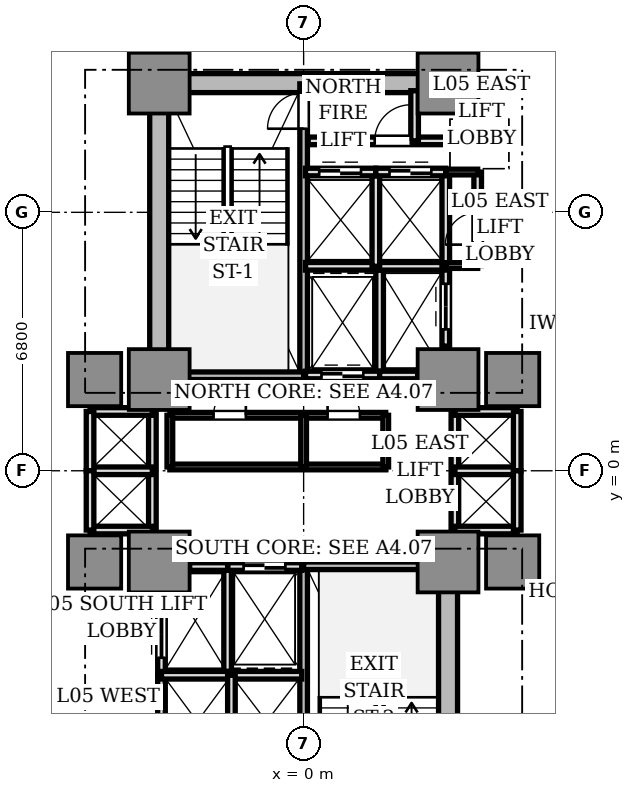
"""IFC4 building model, lengths in metres.
Left out: names, types, materials, properties, quantities, classifications, styles, units other than length and angle.
Written with IfcOpenShell. Run it as: python <this file> out.ifc"""

import sys

from ifc_helpers import new_model, si_unit, direction, frame, frame_2d, origin, origin_2d, place, context, subcontext, project, spatial, rectangle, extrude, source, transform, mapped, element, fill, save


model = new_model("IFC4")
c1 = context("Model", 3, precision=1e-05, world=origin(), true_north=direction((0.0, 1.0)))
c2 = subcontext(c1, "Body", "Model", "MODEL_VIEW")
j1 = project(units=[si_unit("LENGTHUNIT", "METRE"), si_unit("PLANEANGLEUNIT", "RADIAN")], contexts=[c1])
p1 = place(None, origin())
s1 = spatial("IfcSite", under=j1, at=p1, CompositionType="ELEMENT")
p2 = place(p1, origin())
s2 = spatial("IfcBuilding", under=s1, at=p2, CompositionType="ELEMENT")
p3 = place(p2, frame((0.0, 0.0, 23.1)))
s3 = spatial("IfcBuildingStorey", under=s2, at=p3, CompositionType="ELEMENT", Elevation=23.1)
p4 = place(p3, frame((-3.55, 10.2, 0.0), z_axis=(0.0, 0.0, 1.0), x_axis=(1.0, 0.0, 0.0)))
e1 = element("IfcWall", 1, at=p4, inside=s3, PredefinedType="SHEAR", context=c2, shape_type="SweptSolid", body=[
    extrude(rectangle(XDim=7.1, YDim=0.5, at=frame_2d((3.55, 0.0))), origin(), (0.0, 0.0, 1.0), 3.11),
])
for number, where, z_axis, x_axis in (
    (2, (-3.8, 2.85, 0.0), (0.0, 0.0, 1.0), (0.0, 1.0, 0.0)),
    (3, (3.8, -9.75, 0.0), (0.0, 0.0, 1.0), (0.0, 1.0, 0.0)),
):
    element("IfcWall", number, at=place(p3, frame(where, z_axis=z_axis, x_axis=x_axis)), inside=s3, PredefinedType="SHEAR", context=c2, shape_type="SweptSolid", body=[
        extrude(rectangle(XDim=6.9, YDim=0.5, at=frame_2d((3.45, 0.0))), origin(), (0.0, 0.0, 1.0), 3.11),
    ])
m1 = source(origin(), c2, "Body", "SweptSolid", [
    extrude(rectangle(XDim=1.6, YDim=1.6, at=origin_2d()), origin(), (0.0, 0.0, 1.0), 3.11),
])
for number, where, z_axis, x_axis in (
    (4, (-3.8, 2.4, 0.0), (0.0, 0.0, 1.0), (1.0, 0.0, 0.0)),
    (5, (3.8, 2.4, 0.0), (0.0, 0.0, 1.0), (1.0, 0.0, 0.0)),
    (6, (-3.8, 10.2, 0.0), (0.0, 0.0, 1.0), (1.0, 0.0, 0.0)),
    (7, (3.8, 10.2, 0.0), (0.0, 0.0, 1.0), (1.0, 0.0, 0.0)),
    (8, (-3.8, -2.4, 0.0), (0.0, 0.0, 1.0), (1.0, 0.0, 0.0)),
    (9, (3.8, -2.4, 0.0), (0.0, 0.0, 1.0), (1.0, 0.0, 0.0)),
):
    element("IfcColumn", number, at=place(p3, frame(where, z_axis=z_axis, x_axis=x_axis)), inside=s3, PredefinedType="COLUMN", context=c2, shape_type="MappedRepresentation", body=[
        mapped(m1, transform((0.0, 0.0, 0.0), scale=1.0)),
    ])
m2 = source(origin(), c2, "Body", "SweptSolid", [
    extrude(rectangle(XDim=1.4, YDim=1.4, at=origin_2d()), origin(), (0.0, 0.0, 1.0), 3.11),
])
for number, where, z_axis, x_axis in (
    (10, (5.5, 2.4, 0.0), (0.0, 0.0, 1.0), (1.0, 0.0, 0.0)),
    (11, (-5.5, 2.4, 0.0), (0.0, 0.0, 1.0), (1.0, 0.0, 0.0)),
    (12, (5.5, -2.4, 0.0), (0.0, 0.0, 1.0), (1.0, 0.0, 0.0)),
    (13, (-5.5, -2.4, 0.0), (0.0, 0.0, 1.0), (1.0, 0.0, 0.0)),
):
    element("IfcColumn", number, at=place(p3, frame(where, z_axis=z_axis, x_axis=x_axis)), inside=s3, PredefinedType="COLUMN", context=c2, shape_type="MappedRepresentation", body=[
        mapped(m2, transform((0.0, 0.0, 0.0), scale=1.0)),
    ])
p5 = place(p3, frame((0.0, 2.5, 0.0), z_axis=(0.0, 0.0, 1.0), x_axis=(0.0, 1.0, 0.0)))
e14 = element("IfcWall", 14, at=p5, inside=s3, PredefinedType="SOLIDWALL", context=c2, shape_type="SweptSolid", body=[
    extrude(rectangle(XDim=7.68, YDim=0.2, at=frame_2d((3.84, 0.0))), origin(), (0.0, 0.0, 1.0), 3.11),
])
p6 = place(p5, frame((6.5, 0.0, 0.0)))
e15 = element("IfcOpeningElement", 15, at=p6, cuts=e14, PredefinedType="OPENING", context=c2, shape_type="SweptSolid", body=[
    extrude(rectangle(XDim=0.95, YDim=2.15, at=frame_2d((0.475, 1.075))), frame((0.0, 0.11, 0.0), z_axis=(0.0, -1.0, 0.0), x_axis=(1.0, 0.0, 0.0)), (0.0, 0.0, 1.0), 0.22),
])
p7 = place(p3, frame((-3.72, 2.5, 0.0), z_axis=(0.0, 0.0, 1.0), x_axis=(1.0, 0.0, 0.0)))
e16 = element("IfcWall", 16, at=p7, inside=s3, PredefinedType="SOLIDWALL", context=c2, shape_type="SweptSolid", body=[
    extrude(rectangle(XDim=3.72, YDim=0.2, at=frame_2d((1.86, 0.0))), origin(), (0.0, 0.0, 1.0), 3.11),
])
p8 = place(p3, frame((0.0, -10.18, 0.0), z_axis=(0.0, 0.0, 1.0), x_axis=(0.0, 1.0, 0.0)))
e17 = element("IfcWall", 17, at=p8, inside=s3, PredefinedType="SOLIDWALL", context=c2, shape_type="SweptSolid", body=[
    extrude(rectangle(XDim=7.68, YDim=0.2, at=frame_2d((3.84, 0.0))), origin(), (0.0, 0.0, 1.0), 3.11),
])
p9 = place(p8, frame((0.28, 0.0, 0.0)))
e18 = element("IfcOpeningElement", 18, at=p9, cuts=e17, PredefinedType="OPENING", context=c2, shape_type="SweptSolid", body=[
    extrude(rectangle(XDim=1.1, YDim=2.15, at=frame_2d((0.55, 1.075))), frame((0.0, 0.11, 0.0), z_axis=(0.0, -1.0, 0.0), x_axis=(1.0, 0.0, 0.0)), (0.0, 0.0, 1.0), 0.22),
])
p10 = place(p3, frame((0.0, -2.5, 0.0), z_axis=(0.0, 0.0, 1.0), x_axis=(1.0, 0.0, 0.0)))
e19 = element("IfcWall", 19, at=p10, inside=s3, PredefinedType="SOLIDWALL", context=c2, shape_type="SweptSolid", body=[
    extrude(rectangle(XDim=3.72, YDim=0.2, at=frame_2d((1.86, 0.0))), origin(), (0.0, 0.0, 1.0), 3.11),
])
p11 = place(p3, frame((2.0, 2.5, 0.0), z_axis=(0.0, 0.0, 1.0), x_axis=(0.0, 1.0, 0.0)))
e20 = element("IfcWall", 20, at=p11, inside=s3, PredefinedType="SOLIDWALL", context=c2, shape_type="SweptSolid", body=[
    extrude(rectangle(XDim=2.78, YDim=0.2, at=frame_2d((1.39, 0.0))), origin(), (0.0, 0.0, 1.0), 2.66),
])
p12 = place(p3, frame((0.05, 2.52, 0.0), z_axis=(0.0, 0.0, 1.0), x_axis=(1.0, 0.0, 0.0)))
e21 = element("IfcWall", 21, at=p12, inside=s3, PredefinedType="SOLIDWALL", context=c2, shape_type="SweptSolid", body=[
    extrude(rectangle(XDim=1.95, YDim=0.2, at=frame_2d((0.975, 0.0))), origin(), (0.0, 0.0, 1.0), 2.66),
])
p13 = place(p12, frame((0.42, 0.0, 0.0)))
e22 = element("IfcOpeningElement", 22, at=p13, cuts=e21, PredefinedType="OPENING", context=c2, shape_type="SweptSolid", body=[
    extrude(rectangle(XDim=1.1, YDim=2.2, at=frame_2d((0.55, 1.1))), frame((0.0, 0.11, 0.0), z_axis=(0.0, -1.0, 0.0), x_axis=(1.0, 0.0, 0.0)), (0.0, 0.0, 1.0), 0.22),
])
p14 = place(p3, frame((-2.0, -5.28, 0.0), z_axis=(0.0, 0.0, 1.0), x_axis=(0.0, 1.0, 0.0)))
e23 = element("IfcWall", 23, at=p14, inside=s3, PredefinedType="SOLIDWALL", context=c2, shape_type="SweptSolid", body=[
    extrude(rectangle(XDim=2.78, YDim=0.2, at=frame_2d((1.39, 0.0))), origin(), (0.0, 0.0, 1.0), 2.66),
])
p15 = place(p3, frame((-2.0, -2.52, 0.0), z_axis=(0.0, 0.0, 1.0), x_axis=(1.0, 0.0, 0.0)))
e24 = element("IfcWall", 24, at=p15, inside=s3, PredefinedType="SOLIDWALL", context=c2, shape_type="SweptSolid", body=[
    extrude(rectangle(XDim=1.95, YDim=0.2, at=frame_2d((0.975, 0.0))), origin(), (0.0, 0.0, 1.0), 2.66),
])
p16 = place(p15, frame((0.42, 0.0, 0.0)))
e25 = element("IfcOpeningElement", 25, at=p16, cuts=e24, PredefinedType="OPENING", context=c2, shape_type="SweptSolid", body=[
    extrude(rectangle(XDim=1.1, YDim=2.2, at=frame_2d((0.55, 1.1))), frame((0.0, 0.11, 0.0), z_axis=(0.0, -1.0, 0.0), x_axis=(1.0, 0.0, 0.0)), (0.0, 0.0, 1.0), 0.22),
])
p17 = place(p3, frame((2.0, 2.52, 0.0), z_axis=(0.0, 0.0, 1.0), x_axis=(1.0, 0.0, 0.0)))
e26 = element("IfcWall", 26, at=p17, inside=s3, PredefinedType="SOLIDWALL", context=c2, shape_type="SweptSolid", body=[
    extrude(rectangle(XDim=1.0, YDim=0.2, at=frame_2d((0.5, 0.0))), origin(), (0.0, 0.0, 1.0), 2.66),
])
p18 = place(p3, frame((3.74, 3.28, 0.0), z_axis=(0.0, 0.0, 1.0), x_axis=(0.0, 1.0, 0.0)))
e27 = element("IfcWall", 27, at=p18, inside=s3, PredefinedType="SOLIDWALL", context=c2, shape_type="SweptSolid", body=[
    extrude(rectangle(XDim=2.08, YDim=0.2, at=frame_2d((1.04, 0.0))), origin(), (0.0, 0.0, 1.0), 2.66),
])
p19 = place(p18, frame((0.44, 0.0, 0.0)))
e28 = element("IfcOpeningElement", 28, at=p19, cuts=e27, PredefinedType="OPENING", context=c2, shape_type="SweptSolid", body=[
    extrude(rectangle(XDim=1.2, YDim=2.2, at=frame_2d((0.6, 1.1))), frame((0.0, 0.11, 0.0), z_axis=(0.0, -1.0, 0.0), x_axis=(1.0, 0.0, 0.0)), (0.0, 0.0, 1.0), 0.22),
])
p20 = place(p3, frame((-3.0, -2.52, 0.0), z_axis=(0.0, 0.0, 1.0), x_axis=(1.0, 0.0, 0.0)))
e29 = element("IfcWall", 29, at=p20, inside=s3, PredefinedType="SOLIDWALL", context=c2, shape_type="SweptSolid", body=[
    extrude(rectangle(XDim=1.0, YDim=0.2, at=frame_2d((0.5, 0.0))), origin(), (0.0, 0.0, 1.0), 2.66),
])
p21 = place(p3, frame((-3.74, -5.36, 0.0), z_axis=(0.0, 0.0, 1.0), x_axis=(0.0, 1.0, 0.0)))
e30 = element("IfcWall", 30, at=p21, inside=s3, PredefinedType="SOLIDWALL", context=c2, shape_type="SweptSolid", body=[
    extrude(rectangle(XDim=2.08, YDim=0.2, at=frame_2d((1.04, 0.0))), origin(), (0.0, 0.0, 1.0), 2.66),
])
p22 = place(p21, frame((0.44, 0.0, 0.0)))
e31 = element("IfcOpeningElement", 31, at=p22, cuts=e30, PredefinedType="OPENING", context=c2, shape_type="SweptSolid", body=[
    extrude(rectangle(XDim=1.2, YDim=2.2, at=frame_2d((0.6, 1.1))), frame((0.0, 0.11, 0.0), z_axis=(0.0, -1.0, 0.0), x_axis=(1.0, 0.0, 0.0)), (0.0, 0.0, 1.0), 0.22),
])
p23 = place(p3, frame((0.05, 5.38, 0.0), z_axis=(0.0, 0.0, 1.0), x_axis=(1.0, 0.0, 0.0)))
e32 = element("IfcWall", 32, at=p23, inside=s3, PredefinedType="SOLIDWALL", context=c2, shape_type="SweptSolid", body=[
    extrude(rectangle(XDim=3.69, YDim=0.2, at=frame_2d((1.845, 0.0))), origin(), (0.0, 0.0, 1.0), 2.66),
])
p24 = place(p3, frame((1.9, 5.38, 0.0), z_axis=(0.0, 0.0, 1.0), x_axis=(0.0, 1.0, 0.0)))
e33 = element("IfcWall", 33, at=p24, inside=s3, PredefinedType="SOLIDWALL", context=c2, shape_type="SweptSolid", body=[
    extrude(rectangle(XDim=2.48, YDim=0.2, at=frame_2d((1.24, 0.0))), origin(), (0.0, 0.0, 1.0), 2.66),
])
p25 = place(p3, frame((0.05, 7.86, 0.0), z_axis=(0.0, 0.0, 1.0), x_axis=(1.0, 0.0, 0.0)))
e34 = element("IfcWall", 34, at=p25, inside=s3, PredefinedType="SOLIDWALL", context=c2, shape_type="SweptSolid", body=[
    extrude(rectangle(XDim=1.85, YDim=0.2, at=frame_2d((0.925, 0.0))), origin(), (0.0, 0.0, 1.0), 2.66),
])
p26 = place(p25, frame((0.36, 0.0, 0.0)))
e35 = element("IfcOpeningElement", 35, at=p26, cuts=e34, PredefinedType="OPENING", context=c2, shape_type="SweptSolid", body=[
    extrude(rectangle(XDim=1.1, YDim=2.2, at=frame_2d((0.55, 1.1))), frame((0.0, 0.11, 0.0), z_axis=(0.0, -1.0, 0.0), x_axis=(1.0, 0.0, 0.0)), (0.0, 0.0, 1.0), 0.22),
])
p27 = place(p3, frame((3.74, 5.38, 0.0), z_axis=(0.0, 0.0, 1.0), x_axis=(0.0, 1.0, 0.0)))
e36 = element("IfcWall", 36, at=p27, inside=s3, PredefinedType="SOLIDWALL", context=c2, shape_type="SweptSolid", body=[
    extrude(rectangle(XDim=2.48, YDim=0.2, at=frame_2d((1.24, 0.0))), origin(), (0.0, 0.0, 1.0), 2.66),
])
p28 = place(p3, frame((1.9, 7.86, 0.0), z_axis=(0.0, 0.0, 1.0), x_axis=(1.0, 0.0, 0.0)))
e37 = element("IfcWall", 37, at=p28, inside=s3, PredefinedType="SOLIDWALL", context=c2, shape_type="SweptSolid", body=[
    extrude(rectangle(XDim=1.84, YDim=0.2, at=frame_2d((0.92, 0.0))), origin(), (0.0, 0.0, 1.0), 2.66),
])
p29 = place(p28, frame((0.36, 0.0, 0.0)))
e38 = element("IfcOpeningElement", 38, at=p29, cuts=e37, PredefinedType="OPENING", context=c2, shape_type="SweptSolid", body=[
    extrude(rectangle(XDim=1.1, YDim=2.2, at=frame_2d((0.55, 1.1))), frame((0.0, 0.11, 0.0), z_axis=(0.0, -1.0, 0.0), x_axis=(1.0, 0.0, 0.0)), (0.0, 0.0, 1.0), 0.22),
])
p30 = place(p3, frame((-3.74, -7.86, 0.0), z_axis=(0.0, 0.0, 1.0), x_axis=(0.0, 1.0, 0.0)))
e39 = element("IfcWall", 39, at=p30, inside=s3, PredefinedType="SOLIDWALL", context=c2, shape_type="SweptSolid", body=[
    extrude(rectangle(XDim=2.48, YDim=0.2, at=frame_2d((1.24, 0.0))), origin(), (0.0, 0.0, 1.0), 2.66),
])
p31 = place(p3, frame((-3.74, -5.38, 0.0), z_axis=(0.0, 0.0, 1.0), x_axis=(1.0, 0.0, 0.0)))
e40 = element("IfcWall", 40, at=p31, inside=s3, PredefinedType="SOLIDWALL", context=c2, shape_type="SweptSolid", body=[
    extrude(rectangle(XDim=3.69, YDim=0.2, at=frame_2d((1.845, 0.0))), origin(), (0.0, 0.0, 1.0), 2.66),
])
p32 = place(p3, frame((-1.9, -7.86, 0.0), z_axis=(0.0, 0.0, 1.0), x_axis=(0.0, 1.0, 0.0)))
e41 = element("IfcWall", 41, at=p32, inside=s3, PredefinedType="SOLIDWALL", context=c2, shape_type="SweptSolid", body=[
    extrude(rectangle(XDim=2.48, YDim=0.2, at=frame_2d((1.24, 0.0))), origin(), (0.0, 0.0, 1.0), 2.66),
])
p33 = place(p3, frame((3.98, -1.56, 0.0), z_axis=(0.0, 0.0, 1.0), x_axis=(0.0, 1.0, 0.0)))
e42 = element("IfcWall", 42, at=p33, inside=s3, PredefinedType="SOLIDWALL", context=c2, shape_type="SweptSolid", body=[
    extrude(rectangle(XDim=3.12, YDim=0.2, at=frame_2d((1.56, 0.0))), origin(), (0.0, 0.0, 1.0), 2.18),
])
for number, where, z_axis, x_axis in (
    (43, (3.98, 1.56, 0.0), (0.0, 0.0, 1.0), (1.0, 0.0, 0.0)),
    (44, (3.98, -1.56, 0.0), (0.0, 0.0, 1.0), (1.0, 0.0, 0.0)),
    (45, (3.98, 0.0, 0.0), (0.0, 0.0, 1.0), (1.0, 0.0, 0.0)),
):
    element("IfcWall", number, at=place(p3, frame(where, z_axis=z_axis, x_axis=x_axis)), inside=s3, PredefinedType="SOLIDWALL", context=c2, shape_type="SweptSolid", body=[
        extrude(rectangle(XDim=1.64, YDim=0.2, at=frame_2d((0.82, 0.0))), origin(), (0.0, 0.0, 1.0), 2.66),
    ])
for number, where, z_axis, x_axis in (
    (46, (5.62, 0.0, 0.0), (0.0, 0.0, 1.0), (0.0, 1.0, 0.0)),
    (47, (5.62, -1.56, 0.0), (0.0, 0.0, 1.0), (0.0, 1.0, 0.0)),
):
    element("IfcWall", number, at=place(p3, frame(where, z_axis=z_axis, x_axis=x_axis)), inside=s3, PredefinedType="SOLIDWALL", context=c2, shape_type="SweptSolid", body=[
        extrude(rectangle(XDim=1.56, YDim=0.2, at=frame_2d((0.78, 0.0))), origin(), (0.0, 0.0, 1.0), 2.66),
    ])
p34 = place(p3, frame((-3.98, -1.56, 0.0), z_axis=(0.0, 0.0, 1.0), x_axis=(0.0, 1.0, 0.0)))
e48 = element("IfcWall", 48, at=p34, inside=s3, PredefinedType="SOLIDWALL", context=c2, shape_type="SweptSolid", body=[
    extrude(rectangle(XDim=3.12, YDim=0.2, at=frame_2d((1.56, 0.0))), origin(), (0.0, 0.0, 1.0), 2.18),
])
for number, where, z_axis, x_axis in (
    (49, (-5.62, 1.56, 0.0), (0.0, 0.0, 1.0), (1.0, 0.0, 0.0)),
    (50, (-5.62, -1.56, 0.0), (0.0, 0.0, 1.0), (1.0, 0.0, 0.0)),
    (51, (-5.62, 0.0, 0.0), (0.0, 0.0, 1.0), (1.0, 0.0, 0.0)),
):
    element("IfcWall", number, at=place(p3, frame(where, z_axis=z_axis, x_axis=x_axis)), inside=s3, PredefinedType="SOLIDWALL", context=c2, shape_type="SweptSolid", body=[
        extrude(rectangle(XDim=1.64, YDim=0.2, at=frame_2d((0.82, 0.0))), origin(), (0.0, 0.0, 1.0), 2.66),
    ])
for number, where, z_axis, x_axis in (
    (52, (-5.62, 0.0, 0.0), (0.0, 0.0, 1.0), (0.0, 1.0, 0.0)),
    (53, (-5.62, -1.56, 0.0), (0.0, 0.0, 1.0), (0.0, 1.0, 0.0)),
):
    element("IfcWall", number, at=place(p3, frame(where, z_axis=z_axis, x_axis=x_axis)), inside=s3, PredefinedType="SOLIDWALL", context=c2, shape_type="SweptSolid", body=[
        extrude(rectangle(XDim=1.56, YDim=0.2, at=frame_2d((0.78, 0.0))), origin(), (0.0, 0.0, 1.0), 2.66),
    ])
p35 = place(p3, frame((0.12, 8.68, 0.0), z_axis=(0.0, 0.0, 1.0), x_axis=(1.0, 0.0, 0.0)))
e54 = element("IfcWall", 54, at=p35, inside=s3, PredefinedType="SOLIDWALL", context=c2, shape_type="SweptSolid", body=[
    extrude(rectangle(XDim=3.62, YDim=0.2, at=frame_2d((1.81, 0.0))), origin(), (0.0, 0.0, 1.0), 2.66),
])
p36 = place(p35, frame((1.75, 0.0, 0.0)))
e55 = element("IfcOpeningElement", 55, at=p36, cuts=e54, PredefinedType="OPENING", context=c2, shape_type="SweptSolid", body=[
    extrude(rectangle(XDim=0.95, YDim=2.15, at=frame_2d((0.475, 1.075))), frame((0.0, 0.11, 0.0), z_axis=(0.0, -1.0, 0.0), x_axis=(1.0, 0.0, 0.0)), (0.0, 0.0, 1.0), 0.22),
])
p37 = place(p3, frame((2.92, 8.68, 0.0), z_axis=(0.0, 0.0, 1.0), x_axis=(0.0, 1.0, 0.0)))
e56 = element("IfcWall", 56, at=p37, inside=s3, PredefinedType="SOLIDWALL", context=c2, shape_type="SweptSolid", body=[
    extrude(rectangle(XDim=1.32, YDim=0.2, at=frame_2d((0.66, 0.0))), origin(), (0.0, 0.0, 1.0), 2.66),
])
p38 = place(p3, frame((4.58, 5.4, 0.0), z_axis=(0.0, 0.0, 1.0), x_axis=(0.0, 1.0, 0.0)))
e57 = element("IfcWall", 57, at=p38, inside=s3, PredefinedType="SOLIDWALL", context=c2, shape_type="SweptSolid", body=[
    extrude(rectangle(XDim=2.46, YDim=0.2, at=frame_2d((1.23, 0.0))), origin(), (0.0, 0.0, 1.0), 2.66),
])
p39 = place(p38, frame((0.55, 0.0, 0.0)))
e58 = element("IfcOpeningElement", 58, at=p39, cuts=e57, PredefinedType="OPENING", context=c2, shape_type="SweptSolid", body=[
    extrude(rectangle(XDim=0.85, YDim=2.1, at=frame_2d((0.425, 1.05))), frame((0.0, 0.11, 0.0), z_axis=(0.0, -1.0, 0.0), x_axis=(1.0, 0.0, 0.0)), (0.0, 0.0, 1.0), 0.22),
])
for number, where, z_axis, x_axis in (
    (59, (3.74, 5.4, 0.0), (0.0, 0.0, 1.0), (1.0, 0.0, 0.0)),
    (60, (3.74, 7.86, 0.0), (0.0, 0.0, 1.0), (1.0, 0.0, 0.0)),
):
    element("IfcWall", number, at=place(p3, frame(where, z_axis=z_axis, x_axis=x_axis)), inside=s3, PredefinedType="PARTITIONING", context=c2, shape_type="SweptSolid", body=[
        extrude(rectangle(XDim=0.84, YDim=0.15, at=frame_2d((0.42, 0.0))), origin(), (0.0, 0.0, 1.0), 2.66),
    ])
p40 = place(p3, frame((-3.52, 0.1, 0.0), z_axis=(0.0, 0.0, 1.0), x_axis=(1.0, 0.0, 0.0)))
e61 = element("IfcWall", 61, at=p40, inside=s3, PredefinedType="PARTITIONING", context=c2, shape_type="SweptSolid", body=[
    extrude(rectangle(XDim=5.68, YDim=0.15, at=frame_2d((2.84, 0.0))), origin(), (0.0, 0.0, 1.0), 2.66),
])
p41 = place(p3, frame((-3.52, 1.46, 0.0), z_axis=(0.0, 0.0, 1.0), x_axis=(1.0, 0.0, 0.0)))
e62 = element("IfcWall", 62, at=p41, inside=s3, PredefinedType="PARTITIONING", context=c2, shape_type="SweptSolid", body=[
    extrude(rectangle(XDim=5.68, YDim=0.15, at=frame_2d((2.84, 0.0))), origin(), (0.0, 0.0, 1.0), 2.66),
])
p42 = place(p41, frame((1.15, 0.0, 0.0)))
e63 = element("IfcOpeningElement", 63, at=p42, cuts=e62, PredefinedType="OPENING", context=c2, shape_type="SweptSolid", body=[
    extrude(rectangle(XDim=0.85, YDim=2.1, at=frame_2d((0.425, 1.05))), frame((0.0, 0.085, 0.0), z_axis=(0.0, -1.0, 0.0), x_axis=(1.0, 0.0, 0.0)), (0.0, 0.0, 1.0), 0.17),
])
p43 = place(p41, frame((4.15, 0.0, 0.0)))
e64 = element("IfcOpeningElement", 64, at=p43, cuts=e62, PredefinedType="OPENING", context=c2, shape_type="SweptSolid", body=[
    extrude(rectangle(XDim=0.85, YDim=2.1, at=frame_2d((0.425, 1.05))), frame((0.0, 0.085, 0.0), z_axis=(0.0, -1.0, 0.0), x_axis=(1.0, 0.0, 0.0)), (0.0, 0.0, 1.0), 0.17),
])
p44 = place(p3, frame((-3.52, 0.1, 0.0), z_axis=(0.0, 0.0, 1.0), x_axis=(0.0, 1.0, 0.0)))
e65 = element("IfcWall", 65, at=p44, inside=s3, PredefinedType="PARTITIONING", context=c2, shape_type="SweptSolid", body=[
    extrude(rectangle(XDim=1.36, YDim=0.15, at=frame_2d((0.68, 0.0))), origin(), (0.0, 0.0, 1.0), 2.18),
])
for number, where, z_axis, x_axis in (
    (66, (2.16, 0.1, 0.0), (0.0, 0.0, 1.0), (0.0, 1.0, 0.0)),
    (67, (0.0, 0.1, 0.0), (0.0, 0.0, 1.0), (0.0, 1.0, 0.0)),
):
    element("IfcWall", number, at=place(p3, frame(where, z_axis=z_axis, x_axis=x_axis)), inside=s3, PredefinedType="PARTITIONING", context=c2, shape_type="SweptSolid", body=[
        extrude(rectangle(XDim=1.36, YDim=0.15, at=frame_2d((0.68, 0.0))), origin(), (0.0, 0.0, 1.0), 2.66),
    ])
m3 = source(origin(), c2, "Body", "SweptSolid", [
    extrude(rectangle(XDim=1.1, YDim=0.05, at=origin_2d()), origin(), (0.0, 0.0, 1.0), 2.2),
])
p45 = place(p13, frame((0.55, 0.0, 0.0)))
e68 = element("IfcDoor", 68, at=p45, inside=s3, OperationType="DOUBLE_DOOR_SLIDING", PredefinedType="DOOR", context=c2, shape_type="MappedRepresentation", body=[
    mapped(m3, transform((0.0, 0.0, 0.0), scale=1.0)),
])
fill(e22, e68)
p46 = place(p16, frame((0.55, 0.0, 0.0)))
e69 = element("IfcDoor", 69, at=p46, inside=s3, OperationType="DOUBLE_DOOR_SLIDING", PredefinedType="DOOR", context=c2, shape_type="MappedRepresentation", body=[
    mapped(m3, transform((0.0, 0.0, 0.0), scale=1.0)),
])
fill(e25, e69)
m4 = source(origin(), c2, "Body", "SweptSolid", [
    extrude(rectangle(XDim=1.2, YDim=0.05, at=origin_2d()), origin(), (0.0, 0.0, 1.0), 2.2),
])
p47 = place(p19, frame((0.6, 0.0, 0.0)))
e70 = element("IfcDoor", 70, at=p47, inside=s3, OperationType="DOUBLE_DOOR_SLIDING", PredefinedType="DOOR", context=c2, shape_type="MappedRepresentation", body=[
    mapped(m4, transform((0.0, 0.0, 0.0), scale=1.0)),
])
fill(e28, e70)
p48 = place(p22, frame((0.6, 0.0, 0.0)))
e71 = element("IfcDoor", 71, at=p48, inside=s3, OperationType="DOUBLE_DOOR_SLIDING", PredefinedType="DOOR", context=c2, shape_type="MappedRepresentation", body=[
    mapped(m4, transform((0.0, 0.0, 0.0), scale=1.0)),
])
fill(e31, e71)
p49 = place(p26, frame((0.55, 0.0, 0.0)))
e72 = element("IfcDoor", 72, at=p49, inside=s3, OperationType="DOUBLE_DOOR_SLIDING", PredefinedType="DOOR", context=c2, shape_type="MappedRepresentation", body=[
    mapped(m3, transform((0.0, 0.0, 0.0), scale=1.0)),
])
fill(e35, e72)
p50 = place(p29, frame((0.55, 0.0, 0.0)))
e73 = element("IfcDoor", 73, at=p50, inside=s3, OperationType="DOUBLE_DOOR_SLIDING", PredefinedType="DOOR", context=c2, shape_type="MappedRepresentation", body=[
    mapped(m3, transform((0.0, 0.0, 0.0), scale=1.0)),
])
fill(e38, e73)
m5 = source(origin(), c2, "Body", "SweptSolid", [
    extrude(rectangle(XDim=0.95, YDim=0.05, at=origin_2d()), origin(), (0.0, 0.0, 1.0), 2.15),
])
p51 = place(p6, frame((0.475, 0.0, 0.0)))
e74 = element("IfcDoor", 74, at=p51, inside=s3, OperationType="SINGLE_SWING_LEFT", PredefinedType="DOOR", context=c2, shape_type="MappedRepresentation", body=[
    mapped(m5, transform((0.0, 0.0, 0.0), scale=1.0)),
])
fill(e15, e74)
p52 = place(p36, frame((0.475, 0.0, 0.0)))
e75 = element("IfcDoor", 75, at=p52, inside=s3, OperationType="SINGLE_SWING_RIGHT", PredefinedType="DOOR", context=c2, shape_type="MappedRepresentation", body=[
    mapped(m5, transform((0.0, 0.0, 0.0), scale=1.0)),
])
fill(e55, e75)
m6 = source(origin(), c2, "Body", "SweptSolid", [
    extrude(rectangle(XDim=0.85, YDim=0.05, at=origin_2d()), origin(), (0.0, 0.0, 1.0), 2.1),
])
p53 = place(p39, frame((0.425, 0.0, 0.0)))
e76 = element("IfcDoor", 76, at=p53, inside=s3, OperationType="SINGLE_SWING_LEFT", PredefinedType="DOOR", context=c2, shape_type="MappedRepresentation", body=[
    mapped(m6, transform((0.0, 0.0, 0.0), scale=1.0)),
])
fill(e58, e76)
p54 = place(p42, frame((0.425, 0.0, 0.0)))
e77 = element("IfcDoor", 77, at=p54, inside=s3, OperationType="SINGLE_SWING_RIGHT", PredefinedType="DOOR", context=c2, shape_type="MappedRepresentation", body=[
    mapped(m6, transform((0.0, 0.0, 0.0), scale=1.0)),
])
fill(e63, e77)
p55 = place(p43, frame((0.425, 0.0, 0.0)))
e78 = element("IfcDoor", 78, at=p55, inside=s3, OperationType="SINGLE_SWING_LEFT", PredefinedType="DOOR", context=c2, shape_type="MappedRepresentation", body=[
    mapped(m6, transform((0.0, 0.0, 0.0), scale=1.0)),
])
fill(e64, e78)
save(model, sys.argv[1])
